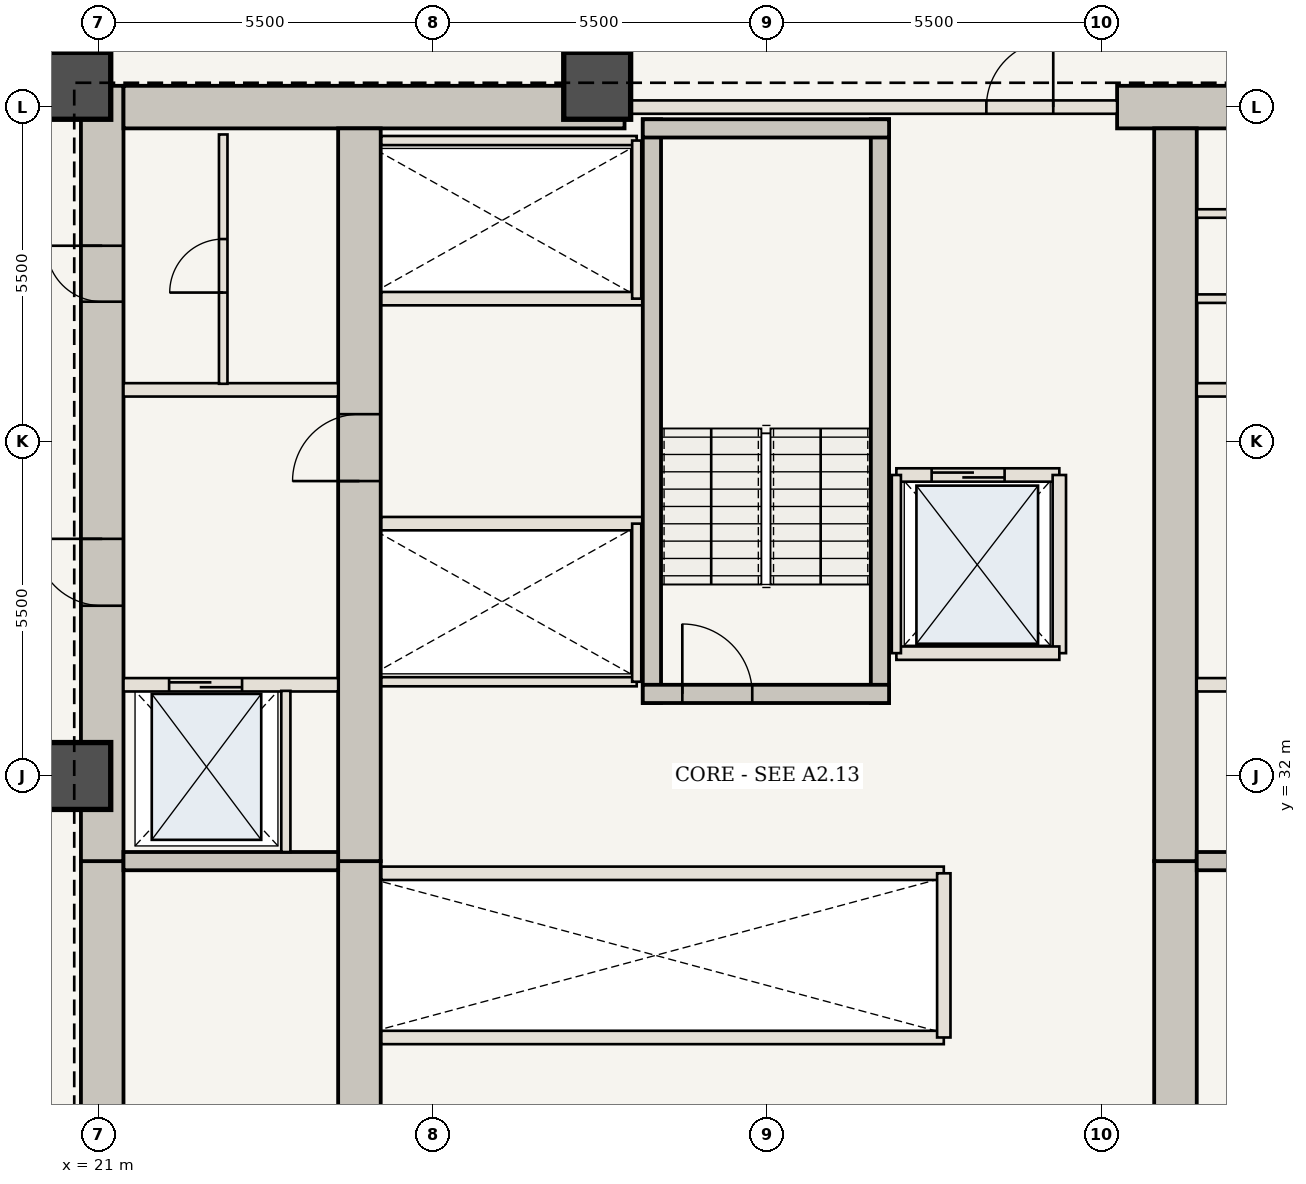
"""IFC4 building model, lengths in metres.
Left out: names, types, materials, properties, quantities, classifications, styles, units other than length and angle.
Written with IfcOpenShell. Run it as: python <this file> out.ifc"""

import sys

from ifc_helpers import new_model, si_unit, direction, frame, frame_2d, origin, origin_2d, place, context, subcontext, project, spatial, rectangle, extrude, element, fill, save


model = new_model("IFC4")
c1 = context("Model", 3, precision=1e-05, world=origin(), true_north=direction((0.0, 1.0)))
c2 = subcontext(c1, "Body", "Model", "MODEL_VIEW")
j1 = project(units=[si_unit("LENGTHUNIT", "METRE"), si_unit("PLANEANGLEUNIT", "RADIAN")], contexts=[c1])
p1 = place(None, origin())
s1 = spatial("IfcSite", under=j1, at=p1, CompositionType="ELEMENT")
p2 = place(p1, origin())
s2 = spatial("IfcBuilding", under=s1, at=p2, CompositionType="ELEMENT")
p3 = place(p2, frame((0.0, 0.0, 52.85)))
s3 = spatial("IfcBuildingStorey", under=s2, at=p3, CompositionType="ELEMENT", Elevation=52.85)
p4 = place(p3, frame((21.06, 20.6, 0.0), z_axis=(0.0, 0.0, 1.0), x_axis=(0.0, 1.0, 0.0)))
e1 = element("IfcWall", 1, at=p4, inside=s3, PredefinedType="SHEAR", context=c2, shape_type="SweptSolid", body=[
    extrude(rectangle(XDim=10.0, YDim=0.7, at=frame_2d((5.0, 0.0))), origin(), (0.0, 0.0, 1.0), 3.5),
])
p5 = place(p4, frame((1.15, 0.0, 0.0)))
e2 = element("IfcOpeningElement", 2, at=p5, cuts=e1, PredefinedType="OPENING", context=c2, shape_type="SweptSolid", body=[
    extrude(rectangle(XDim=1.15, YDim=2.15, at=frame_2d((0.575, 1.075))), frame((0.0, 0.36, 0.0), z_axis=(0.0, -1.0, 0.0), x_axis=(1.0, 0.0, 0.0)), (0.0, 0.0, 1.0), 0.72),
])
p6 = place(p3, frame((21.06, 30.6, 0.0), z_axis=(0.0, 0.0, 1.0), x_axis=(0.0, 1.0, 0.0)))
e3 = element("IfcWall", 3, at=p6, inside=s3, PredefinedType="SHEAR", context=c2, shape_type="SweptSolid", body=[
    extrude(rectangle(XDim=12.75, YDim=0.7, at=frame_2d((6.375, 0.0))), origin(), (0.0, 0.0, 1.0), 3.5),
])
p7 = place(p6, frame((4.2, 0.0, 0.0)))
e4 = element("IfcOpeningElement", 4, at=p7, cuts=e3, PredefinedType="OPENING", context=c2, shape_type="SweptSolid", body=[
    extrude(rectangle(XDim=1.1, YDim=2.15, at=frame_2d((0.55, 1.075))), frame((0.0, 0.36, 0.0), z_axis=(0.0, -1.0, 0.0), x_axis=(1.0, 0.0, 0.0)), (0.0, 0.0, 1.0), 0.72),
])
p8 = place(p6, frame((9.2, 0.0, 0.0)))
e5 = element("IfcOpeningElement", 5, at=p8, cuts=e3, PredefinedType="OPENING", context=c2, shape_type="SweptSolid", body=[
    extrude(rectangle(XDim=0.92, YDim=2.1, at=frame_2d((0.46, 1.05))), frame((0.0, 0.36, 0.0), z_axis=(0.0, -1.0, 0.0), x_axis=(1.0, 0.0, 0.0)), (0.0, 0.0, 1.0), 0.72),
])
p9 = place(p3, frame((21.41, 43.0, 0.0), z_axis=(0.0, 0.0, 1.0), x_axis=(1.0, 0.0, 0.0)))
e6 = element("IfcWall", 6, at=p9, inside=s3, PredefinedType="SHEAR", context=c2, shape_type="SweptSolid", body=[
    extrude(rectangle(XDim=8.24, YDim=0.7, at=frame_2d((4.12, 0.0))), origin(), (0.0, 0.0, 1.0), 3.5),
])
p10 = place(p3, frame((37.75, 43.0, 0.0), z_axis=(0.0, 0.0, 1.0), x_axis=(1.0, 0.0, 0.0)))
e7 = element("IfcWall", 7, at=p10, inside=s3, PredefinedType="SHEAR", context=c2, shape_type="SweptSolid", body=[
    extrude(rectangle(XDim=4.84, YDim=0.7, at=frame_2d((2.42, 0.0))), origin(), (0.0, 0.0, 1.0), 3.5),
])
p11 = place(p3, frame((25.29, 21.3, 0.0), z_axis=(0.0, 0.0, 1.0), x_axis=(0.0, 1.0, 0.0)))
e8 = element("IfcWall", 8, at=p11, inside=s3, PredefinedType="SHEAR", context=c2, shape_type="SweptSolid", body=[
    extrude(rectangle(XDim=9.3, YDim=0.7, at=frame_2d((4.65, 0.0))), origin(), (0.0, 0.0, 1.0), 3.5),
])
p12 = place(p3, frame((25.29, 30.6, 0.0), z_axis=(0.0, 0.0, 1.0), x_axis=(0.0, 1.0, 0.0)))
e9 = element("IfcWall", 9, at=p12, inside=s3, PredefinedType="SHEAR", context=c2, shape_type="SweptSolid", body=[
    extrude(rectangle(XDim=12.05, YDim=0.7, at=frame_2d((6.025, 0.0))), origin(), (0.0, 0.0, 1.0), 3.5),
])
p13 = place(p12, frame((6.25, 0.0, 0.0)))
e10 = element("IfcOpeningElement", 10, at=p13, cuts=e9, PredefinedType="OPENING", context=c2, shape_type="SweptSolid", body=[
    extrude(rectangle(XDim=1.1, YDim=2.15, at=frame_2d((0.55, 1.075))), frame((0.0, 0.36, 0.0), z_axis=(0.0, -1.0, 0.0), x_axis=(1.0, 0.0, 0.0)), (0.0, 0.0, 1.0), 0.72),
])
p14 = place(p3, frame((38.71, 21.3, 0.0), z_axis=(0.0, 0.0, 1.0), x_axis=(0.0, 1.0, 0.0)))
e11 = element("IfcWall", 11, at=p14, inside=s3, PredefinedType="SHEAR", context=c2, shape_type="SweptSolid", body=[
    extrude(rectangle(XDim=9.3, YDim=0.7, at=frame_2d((4.65, 0.0))), origin(), (0.0, 0.0, 1.0), 3.5),
])
p15 = place(p3, frame((38.71, 30.6, 0.0), z_axis=(0.0, 0.0, 1.0), x_axis=(0.0, 1.0, 0.0)))
e12 = element("IfcWall", 12, at=p15, inside=s3, PredefinedType="SHEAR", context=c2, shape_type="SweptSolid", body=[
    extrude(rectangle(XDim=12.05, YDim=0.7, at=frame_2d((6.025, 0.0))), origin(), (0.0, 0.0, 1.0), 3.5),
])
for number, where, z_axis, x_axis in (
    (13, (29.2, 43.35, 0.0), (0.0, 0.0, 1.0), (1.0, 0.0, 0.0)),
    (14, (20.65, 43.35, 0.0), (0.0, 0.0, 1.0), (1.0, 0.0, 0.0)),
    (15, (20.65, 32.0, 0.0), (0.0, 0.0, 1.0), (1.0, 0.0, 0.0)),
):
    element("IfcColumn", number, at=place(p3, frame(where, z_axis=z_axis, x_axis=x_axis)), inside=s3, PredefinedType="COLUMN", context=c2, shape_type="SweptSolid", body=[
        extrude(rectangle(XDim=1.1, YDim=1.1, at=origin_2d()), origin(), (0.0, 0.0, 1.0), 3.5),
    ])
for number, where, z_axis, x_axis in (
    (16, (21.41, 30.6, 0.0), (0.0, 0.0, 1.0), (1.0, 0.0, 0.0)),
    (17, (39.06, 30.6, 0.0), (0.0, 0.0, 1.0), (1.0, 0.0, 0.0)),
):
    element("IfcWall", number, at=place(p3, frame(where, z_axis=z_axis, x_axis=x_axis)), inside=s3, PredefinedType="SHEAR", context=c2, shape_type="SweptSolid", body=[
        extrude(rectangle(XDim=3.53, YDim=0.3, at=frame_2d((1.765, 0.0))), origin(), (0.0, 0.0, 1.0), 3.32),
    ])
p16 = place(p3, frame((21.41, 33.5, 0.0), z_axis=(0.0, 0.0, 1.0), x_axis=(1.0, 0.0, 0.0)))
e18 = element("IfcWall", 18, at=p16, inside=s3, PredefinedType="STANDARD", context=c2, shape_type="SweptSolid", body=[
    extrude(rectangle(XDim=3.53, YDim=0.22, at=frame_2d((1.765, 0.0))), origin(), (0.0, 0.0, 1.0), 3.32),
])
p17 = place(p16, frame((0.75, 0.0, 0.0)))
e19 = element("IfcOpeningElement", 19, at=p17, cuts=e18, PredefinedType="OPENING", context=c2, shape_type="SweptSolid", body=[
    extrude(rectangle(XDim=1.2, YDim=2.2, at=frame_2d((0.6, 1.1))), frame((0.0, 0.12, 0.0), z_axis=(0.0, -1.0, 0.0), x_axis=(1.0, 0.0, 0.0)), (0.0, 0.0, 1.0), 0.24),
])
p18 = place(p3, frame((24.08, 30.75, 0.0), z_axis=(0.0, 0.0, 1.0), x_axis=(0.0, 1.0, 0.0)))
e20 = element("IfcWall", 20, at=p18, inside=s3, PredefinedType="STANDARD", context=c2, shape_type="SweptSolid", body=[
    extrude(rectangle(XDim=2.65, YDim=0.15, at=frame_2d((1.325, 0.0))), origin(), (0.0, 0.0, 1.0), 3.32),
])
p19 = place(p3, frame((39.06, 33.5, 0.0), z_axis=(0.0, 0.0, 1.0), x_axis=(1.0, 0.0, 0.0)))
e21 = element("IfcWall", 21, at=p19, inside=s3, PredefinedType="STANDARD", context=c2, shape_type="SweptSolid", body=[
    extrude(rectangle(XDim=3.53, YDim=0.22, at=frame_2d((1.765, 0.0))), origin(), (0.0, 0.0, 1.0), 3.32),
])
p20 = place(p19, frame((1.55, 0.0, 0.0)))
e22 = element("IfcOpeningElement", 22, at=p20, cuts=e21, PredefinedType="OPENING", context=c2, shape_type="SweptSolid", body=[
    extrude(rectangle(XDim=1.2, YDim=2.2, at=frame_2d((0.6, 1.1))), frame((0.0, 0.12, 0.0), z_axis=(0.0, -1.0, 0.0), x_axis=(1.0, 0.0, 0.0)), (0.0, 0.0, 1.0), 0.24),
])
for number, where, z_axis, x_axis in (
    (23, (21.41, 38.35, 0.0), (0.0, 0.0, 1.0), (1.0, 0.0, 0.0)),
    (24, (39.06, 38.35, 0.0), (0.0, 0.0, 1.0), (1.0, 0.0, 0.0)),
):
    element("IfcWall", number, at=place(p3, frame(where, z_axis=z_axis, x_axis=x_axis)), inside=s3, PredefinedType="STANDARD", context=c2, shape_type="SweptSolid", body=[
        extrude(rectangle(XDim=3.53, YDim=0.22, at=frame_2d((1.765, 0.0))), origin(), (0.0, 0.0, 1.0), 3.32),
    ])
p21 = place(p3, frame((23.05, 38.45, 0.0), z_axis=(0.0, 0.0, 1.0), x_axis=(0.0, 1.0, 0.0)))
e25 = element("IfcWall", 25, at=p21, inside=s3, PredefinedType="STANDARD", context=c2, shape_type="SweptSolid", body=[
    extrude(rectangle(XDim=4.1, YDim=0.14, at=frame_2d((2.05, 0.0))), origin(), (0.0, 0.0, 1.0), 3.32),
])
p22 = place(p21, frame((1.5, 0.0, 0.0)))
e26 = element("IfcOpeningElement", 26, at=p22, cuts=e25, PredefinedType="OPENING", context=c2, shape_type="SweptSolid", body=[
    extrude(rectangle(XDim=0.88, YDim=2.1, at=frame_2d((0.44, 1.05))), frame((0.0, 0.08, 0.0), z_axis=(0.0, -1.0, 0.0), x_axis=(1.0, 0.0, 0.0)), (0.0, 0.0, 1.0), 0.16),
])
for number, where, z_axis, x_axis in (
    (27, (39.06, 39.85, 0.0), (0.0, 0.0, 1.0), (1.0, 0.0, 0.0)),
    (28, (39.06, 41.25, 0.0), (0.0, 0.0, 1.0), (1.0, 0.0, 0.0)),
):
    element("IfcWall", number, at=place(p3, frame(where, z_axis=z_axis, x_axis=x_axis)), inside=s3, PredefinedType="STANDARD", context=c2, shape_type="SweptSolid", body=[
        extrude(rectangle(XDim=3.53, YDim=0.14, at=frame_2d((1.765, 0.0))), origin(), (0.0, 0.0, 1.0), 3.32),
    ])
for number, where, z_axis, x_axis in (
    (29, (25.65, 27.7, 0.0), (0.0, 0.0, 1.0), (1.0, 0.0, 0.0)),
    (30, (25.65, 30.4, 0.0), (0.0, 0.0, 1.0), (1.0, 0.0, 0.0)),
):
    element("IfcWall", number, at=place(p3, frame(where, z_axis=z_axis, x_axis=x_axis)), inside=s3, PredefinedType="STANDARD", context=c2, shape_type="SweptSolid", body=[
        extrude(rectangle(XDim=9.25, YDim=0.22, at=frame_2d((4.625, 0.0))), origin(), (0.0, 0.0, 1.0), 3.32),
    ])
p23 = place(p3, frame((34.9, 27.7, 0.0), z_axis=(0.0, 0.0, 1.0), x_axis=(0.0, 1.0, 0.0)))
e31 = element("IfcWall", 31, at=p23, inside=s3, PredefinedType="STANDARD", context=c2, shape_type="SweptSolid", body=[
    extrude(rectangle(XDim=2.7, YDim=0.22, at=frame_2d((1.35, 0.0))), origin(), (0.0, 0.0, 1.0), 3.32),
])
p24 = place(p3, frame((25.65, 36.15, 0.0), z_axis=(0.0, 0.0, 1.0), x_axis=(1.0, 0.0, 0.0)))
e32 = element("IfcWall", 32, at=p24, inside=s3, PredefinedType="STANDARD", context=c2, shape_type="SweptSolid", body=[
    extrude(rectangle(XDim=4.3, YDim=0.22, at=frame_2d((2.15, 0.0))), origin(), (0.0, 0.0, 1.0), 3.32),
])
p25 = place(p3, frame((25.65, 33.55, 0.0), z_axis=(0.0, 0.0, 1.0), x_axis=(1.0, 0.0, 0.0)))
e33 = element("IfcWall", 33, at=p25, inside=s3, PredefinedType="STANDARD", context=c2, shape_type="SweptSolid", body=[
    extrude(rectangle(XDim=4.2, YDim=0.15, at=frame_2d((2.1, 0.0))), origin(), (0.0, 0.0, 1.0), 3.32),
])
p26 = place(p3, frame((29.85, 33.55, 0.0), z_axis=(0.0, 0.0, 1.0), x_axis=(0.0, 1.0, 0.0)))
e34 = element("IfcWall", 34, at=p26, inside=s3, PredefinedType="STANDARD", context=c2, shape_type="SweptSolid", body=[
    extrude(rectangle(XDim=2.6, YDim=0.15, at=frame_2d((1.3, 0.0))), origin(), (0.0, 0.0, 1.0), 3.32),
])
p27 = place(p3, frame((25.65, 39.85, 0.0), z_axis=(0.0, 0.0, 1.0), x_axis=(1.0, 0.0, 0.0)))
e35 = element("IfcWall", 35, at=p27, inside=s3, PredefinedType="STANDARD", context=c2, shape_type="SweptSolid", body=[
    extrude(rectangle(XDim=4.3, YDim=0.22, at=frame_2d((2.15, 0.0))), origin(), (0.0, 0.0, 1.0), 3.32),
])
p28 = place(p3, frame((25.65, 42.45, 0.0), z_axis=(0.0, 0.0, 1.0), x_axis=(1.0, 0.0, 0.0)))
e36 = element("IfcWall", 36, at=p28, inside=s3, PredefinedType="STANDARD", context=c2, shape_type="SweptSolid", body=[
    extrude(rectangle(XDim=4.2, YDim=0.15, at=frame_2d((2.1, 0.0))), origin(), (0.0, 0.0, 1.0), 3.32),
])
p29 = place(p3, frame((29.85, 39.85, 0.0), z_axis=(0.0, 0.0, 1.0), x_axis=(0.0, 1.0, 0.0)))
e37 = element("IfcWall", 37, at=p29, inside=s3, PredefinedType="STANDARD", context=c2, shape_type="SweptSolid", body=[
    extrude(rectangle(XDim=2.6, YDim=0.15, at=frame_2d((1.3, 0.0))), origin(), (0.0, 0.0, 1.0), 3.32),
])
for number, where, z_axis, x_axis in (
    (38, (30.1, 33.2, 0.0), (0.0, 0.0, 1.0), (0.0, 1.0, 0.0)),
    (39, (33.85, 33.2, 0.0), (0.0, 0.0, 1.0), (0.0, 1.0, 0.0)),
):
    element("IfcWall", number, at=place(p3, frame(where, z_axis=z_axis, x_axis=x_axis)), inside=s3, PredefinedType="SHEAR", context=c2, shape_type="SweptSolid", body=[
        extrude(rectangle(XDim=9.6, YDim=0.3, at=frame_2d((4.8, 0.0))), origin(), (0.0, 0.0, 1.0), 3.32),
    ])
p30 = place(p3, frame((29.95, 33.35, 0.0), z_axis=(0.0, 0.0, 1.0), x_axis=(1.0, 0.0, 0.0)))
e40 = element("IfcWall", 40, at=p30, inside=s3, PredefinedType="SHEAR", context=c2, shape_type="SweptSolid", body=[
    extrude(rectangle(XDim=4.05, YDim=0.3, at=frame_2d((2.025, 0.0))), origin(), (0.0, 0.0, 1.0), 3.32),
])
p31 = place(p30, frame((0.65, 0.0, 0.0)))
e41 = element("IfcOpeningElement", 41, at=p31, cuts=e40, PredefinedType="OPENING", context=c2, shape_type="SweptSolid", body=[
    extrude(rectangle(XDim=1.15, YDim=2.15, at=frame_2d((0.575, 1.075))), frame((0.0, 0.16, 0.0), z_axis=(0.0, -1.0, 0.0), x_axis=(1.0, 0.0, 0.0)), (0.0, 0.0, 1.0), 0.32),
])
p32 = place(p3, frame((29.95, 42.65, 0.0), z_axis=(0.0, 0.0, 1.0), x_axis=(1.0, 0.0, 0.0)))
e42 = element("IfcWall", 42, at=p32, inside=s3, PredefinedType="SHEAR", context=c2, shape_type="SweptSolid", body=[
    extrude(rectangle(XDim=4.05, YDim=0.3, at=frame_2d((2.025, 0.0))), origin(), (0.0, 0.0, 1.0), 3.32),
])
p33 = place(p3, frame((29.65, 43.0, 0.0), z_axis=(0.0, 0.0, 1.0), x_axis=(1.0, 0.0, 0.0)))
e43 = element("IfcWall", 43, at=p33, inside=s3, PredefinedType="STANDARD", context=c2, shape_type="SweptSolid", body=[
    extrude(rectangle(XDim=8.1, YDim=0.22, at=frame_2d((4.05, 0.0))), origin(), (0.0, 0.0, 1.0), 3.32),
])
p34 = place(p33, frame((5.95, 0.0, 0.0)))
e44 = element("IfcOpeningElement", 44, at=p34, cuts=e43, PredefinedType="OPENING", context=c2, shape_type="SweptSolid", body=[
    extrude(rectangle(XDim=1.1, YDim=2.15, at=frame_2d((0.55, 1.075))), frame((0.0, 0.12, 0.0), z_axis=(0.0, -1.0, 0.0), x_axis=(1.0, 0.0, 0.0)), (0.0, 0.0, 1.0), 0.24),
])
p35 = place(p3, frame((34.12, 36.95, 0.0), z_axis=(0.0, 0.0, 1.0), x_axis=(1.0, 0.0, 0.0)))
e45 = element("IfcWall", 45, at=p35, inside=s3, PredefinedType="STANDARD", context=c2, shape_type="SweptSolid", body=[
    extrude(rectangle(XDim=2.68, YDim=0.22, at=frame_2d((1.34, 0.0))), origin(), (0.0, 0.0, 1.0), 3.32),
])
p36 = place(p35, frame((0.58, 0.0, 0.0)))
e46 = element("IfcOpeningElement", 46, at=p36, cuts=e45, PredefinedType="OPENING", context=c2, shape_type="SweptSolid", body=[
    extrude(rectangle(XDim=1.2, YDim=2.2, at=frame_2d((0.6, 1.1))), frame((0.0, 0.12, 0.0), z_axis=(0.0, -1.0, 0.0), x_axis=(1.0, 0.0, 0.0)), (0.0, 0.0, 1.0), 0.24),
])
p37 = place(p3, frame((36.8, 34.02, 0.0), z_axis=(0.0, 0.0, 1.0), x_axis=(0.0, 1.0, 0.0)))
e47 = element("IfcWall", 47, at=p37, inside=s3, PredefinedType="STANDARD", context=c2, shape_type="SweptSolid", body=[
    extrude(rectangle(XDim=2.93, YDim=0.22, at=frame_2d((1.465, 0.0))), origin(), (0.0, 0.0, 1.0), 3.32),
])
p38 = place(p3, frame((34.12, 34.02, 0.0), z_axis=(0.0, 0.0, 1.0), x_axis=(1.0, 0.0, 0.0)))
e48 = element("IfcWall", 48, at=p38, inside=s3, PredefinedType="STANDARD", context=c2, shape_type="SweptSolid", body=[
    extrude(rectangle(XDim=2.68, YDim=0.22, at=frame_2d((1.34, 0.0))), origin(), (0.0, 0.0, 1.0), 3.32),
])
p39 = place(p3, frame((34.12, 34.02, 0.0), z_axis=(0.0, 0.0, 1.0), x_axis=(0.0, 1.0, 0.0)))
e49 = element("IfcWall", 49, at=p39, inside=s3, PredefinedType="STANDARD", context=c2, shape_type="SweptSolid", body=[
    extrude(rectangle(XDim=2.93, YDim=0.15, at=frame_2d((1.465, 0.0))), origin(), (0.0, 0.0, 1.0), 3.32),
])
p40 = place(p7, origin())
e50 = element("IfcDoor", 50, at=p40, inside=s3, OperationType="SINGLE_SWING_RIGHT", PredefinedType="DOOR", context=c2, shape_type="SweptSolid", body=[
    extrude(rectangle(XDim=1.1, YDim=2.15, at=frame_2d((0.55, 1.075))), frame((0.0, 0.025, 0.0), z_axis=(0.0, -1.0, 0.0), x_axis=(1.0, 0.0, 0.0)), (0.0, 0.0, 1.0), 0.05),
])
fill(e4, e50)
p41 = place(p13, origin())
e51 = element("IfcDoor", 51, at=p41, inside=s3, OperationType="SINGLE_SWING_LEFT", PredefinedType="DOOR", context=c2, shape_type="SweptSolid", body=[
    extrude(rectangle(XDim=1.1, YDim=2.15, at=frame_2d((0.55, 1.075))), frame((0.0, 0.025, 0.0), z_axis=(0.0, -1.0, 0.0), x_axis=(1.0, 0.0, 0.0)), (0.0, 0.0, 1.0), 0.05),
])
fill(e10, e51)
p42 = place(p8, origin())
e52 = element("IfcDoor", 52, at=p42, inside=s3, OperationType="SINGLE_SWING_RIGHT", PredefinedType="DOOR", context=c2, shape_type="SweptSolid", body=[
    extrude(rectangle(XDim=0.92, YDim=2.1, at=frame_2d((0.46, 1.05))), frame((0.0, 0.025, 0.0), z_axis=(0.0, -1.0, 0.0), x_axis=(1.0, 0.0, 0.0)), (0.0, 0.0, 1.0), 0.05),
])
fill(e5, e52)
p43 = place(p17, origin())
e53 = element("IfcDoor", 53, at=p43, inside=s3, OperationType="DOUBLE_DOOR_SLIDING", PredefinedType="DOOR", context=c2, shape_type="SweptSolid", body=[
    extrude(rectangle(XDim=1.2, YDim=2.2, at=frame_2d((0.6, 1.1))), frame((0.0, 0.025, 0.0), z_axis=(0.0, -1.0, 0.0), x_axis=(1.0, 0.0, 0.0)), (0.0, 0.0, 1.0), 0.05),
])
fill(e19, e53)
p44 = place(p22, origin())
e54 = element("IfcDoor", 54, at=p44, inside=s3, OperationType="SINGLE_SWING_LEFT", PredefinedType="DOOR", context=c2, shape_type="SweptSolid", body=[
    extrude(rectangle(XDim=0.88, YDim=2.1, at=frame_2d((0.44, 1.05))), frame((0.0, 0.025, 0.0), z_axis=(0.0, -1.0, 0.0), x_axis=(1.0, 0.0, 0.0)), (0.0, 0.0, 1.0), 0.05),
])
fill(e26, e54)
p45 = place(p31, origin())
e55 = element("IfcDoor", 55, at=p45, inside=s3, OperationType="SINGLE_SWING_LEFT", PredefinedType="DOOR", context=c2, shape_type="SweptSolid", body=[
    extrude(rectangle(XDim=1.15, YDim=2.15, at=frame_2d((0.575, 1.075))), frame((0.0, 0.025, 0.0), z_axis=(0.0, -1.0, 0.0), x_axis=(1.0, 0.0, 0.0)), (0.0, 0.0, 1.0), 0.05),
])
fill(e41, e55)
p46 = place(p34, origin())
e56 = element("IfcDoor", 56, at=p46, inside=s3, OperationType="SINGLE_SWING_RIGHT", PredefinedType="DOOR", context=c2, shape_type="SweptSolid", body=[
    extrude(rectangle(XDim=1.1, YDim=2.15, at=frame_2d((0.55, 1.075))), frame((0.0, 0.025, 0.0), z_axis=(0.0, -1.0, 0.0), x_axis=(1.0, 0.0, 0.0)), (0.0, 0.0, 1.0), 0.05),
])
fill(e44, e56)
p47 = place(p36, origin())
e57 = element("IfcDoor", 57, at=p47, inside=s3, OperationType="DOUBLE_DOOR_SLIDING", PredefinedType="DOOR", context=c2, shape_type="SweptSolid", body=[
    extrude(rectangle(XDim=1.2, YDim=2.2, at=frame_2d((0.6, 1.1))), frame((0.0, 0.025, 0.0), z_axis=(0.0, -1.0, 0.0), x_axis=(1.0, 0.0, 0.0)), (0.0, 0.0, 1.0), 0.05),
])
fill(e46, e57)
save(model, sys.argv[1])
